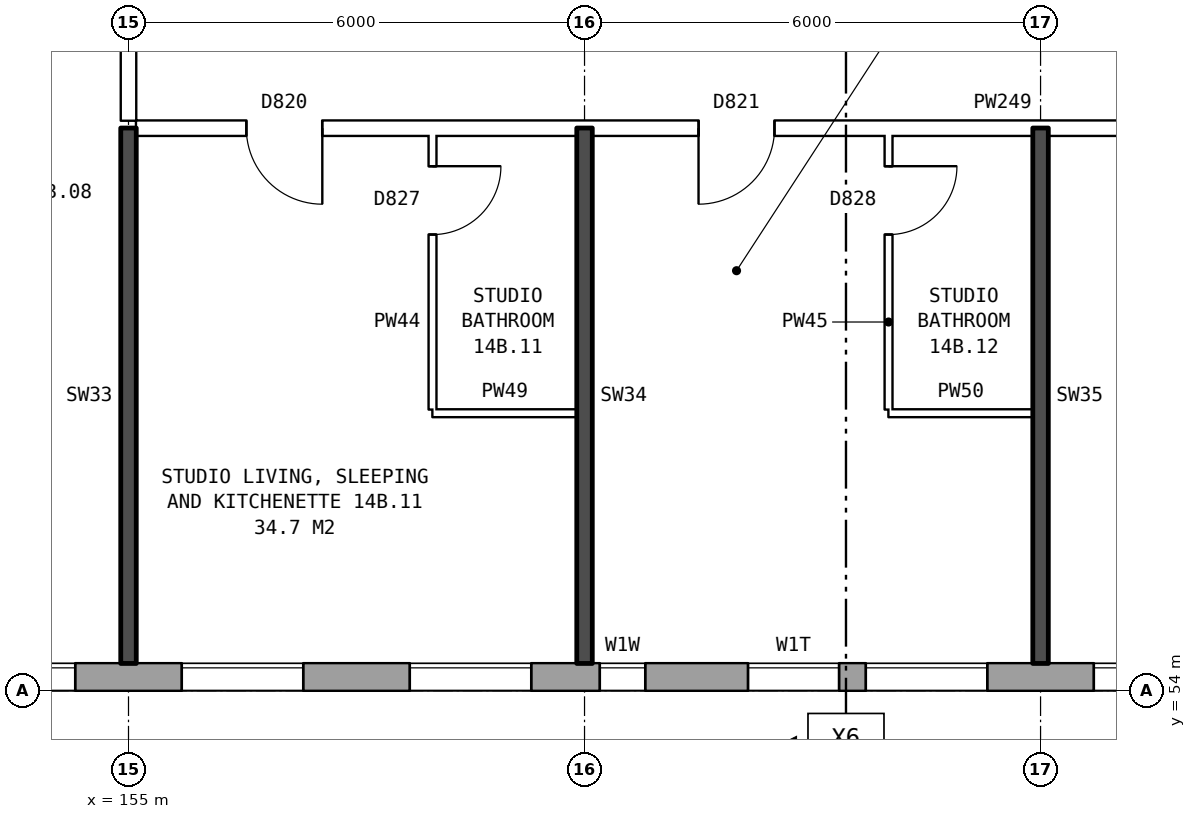
"""IFC4 building model, lengths in metres.
Left out: names, types, materials, properties, quantities, classifications, styles, units other than length and angle.
Written with IfcOpenShell. Run it as: python <this file> out.ifc"""

import sys

from ifc_helpers import new_model, si_unit, direction, frame, frame_2d, origin, place, context, subcontext, project, spatial, rectangle, extrude, element, fill, save


model = new_model("IFC4")
c1 = context("Model", 3, precision=1e-05, world=origin(), true_north=direction((0.0, 1.0)))
c2 = subcontext(c1, "Body", "Model", "MODEL_VIEW")
j1 = project(units=[si_unit("LENGTHUNIT", "METRE"), si_unit("PLANEANGLEUNIT", "RADIAN")], contexts=[c1])
p1 = place(None, origin())
s1 = spatial("IfcSite", under=j1, at=p1, CompositionType="ELEMENT")
p2 = place(p1, origin())
s2 = spatial("IfcBuilding", under=s1, at=p2, CompositionType="ELEMENT")
p3 = place(p2, frame((0.0, 0.0, 53.6)))
s3 = spatial("IfcBuildingStorey", under=s2, at=p3, CompositionType="ELEMENT", Elevation=53.6)
p4 = place(p3, frame((134.075, 54.18, 0.0), z_axis=(0.0, 0.0, 1.0), x_axis=(1.0, 0.0, 0.0)))
e1 = element("IfcWall", 1, at=p4, inside=s3, PredefinedType="STANDARD", context=c2, shape_type="SweptSolid", body=[
    extrude(rectangle(XDim=39.351, YDim=0.36, at=frame_2d((19.675, 0.0))), origin(), (0.0, 0.0, 1.0), 2.85),
])
p5 = place(p4, frame((0.625, 0.0, 0.8)))
e2 = element("IfcOpeningElement", 2, at=p5, cuts=e1, PredefinedType="OPENING", context=c2, shape_type="SweptSolid", body=[
    extrude(rectangle(XDim=1.6, YDim=1.8, at=frame_2d((0.8, 0.9))), frame((0.0, 0.19, 0.0), z_axis=(0.0, -1.0, 0.0), x_axis=(1.0, 0.0, 0.0)), (0.0, 0.0, 1.0), 0.38),
])
p6 = place(p4, frame((3.625, 0.0, 0.8)))
e3 = element("IfcOpeningElement", 3, at=p6, cuts=e1, PredefinedType="OPENING", context=c2, shape_type="SweptSolid", body=[
    extrude(rectangle(XDim=1.6, YDim=1.8, at=frame_2d((0.8, 0.9))), frame((0.0, 0.19, 0.0), z_axis=(0.0, -1.0, 0.0), x_axis=(1.0, 0.0, 0.0)), (0.0, 0.0, 1.0), 0.38),
])
p7 = place(p4, frame((6.625, 0.0, 0.8)))
e4 = element("IfcOpeningElement", 4, at=p7, cuts=e1, PredefinedType="OPENING", context=c2, shape_type="SweptSolid", body=[
    extrude(rectangle(XDim=1.6, YDim=1.8, at=frame_2d((0.8, 0.9))), frame((0.0, 0.19, 0.0), z_axis=(0.0, -1.0, 0.0), x_axis=(1.0, 0.0, 0.0)), (0.0, 0.0, 1.0), 0.38),
])
p8 = place(p4, frame((9.125, 0.0, 1.65)))
e5 = element("IfcOpeningElement", 5, at=p8, cuts=e1, PredefinedType="OPENING", context=c2, shape_type="SweptSolid", body=[
    extrude(rectangle(XDim=1.0, YDim=0.9, at=frame_2d((0.5, 0.45))), frame((0.0, 0.19, 0.0), z_axis=(0.0, -1.0, 0.0), x_axis=(1.0, 0.0, 0.0)), (0.0, 0.0, 1.0), 0.38),
])
p9 = place(p4, frame((12.625, 0.0, 0.8)))
e6 = element("IfcOpeningElement", 6, at=p9, cuts=e1, PredefinedType="OPENING", context=c2, shape_type="SweptSolid", body=[
    extrude(rectangle(XDim=1.6, YDim=1.8, at=frame_2d((0.8, 0.9))), frame((0.0, 0.19, 0.0), z_axis=(0.0, -1.0, 0.0), x_axis=(1.0, 0.0, 0.0)), (0.0, 0.0, 1.0), 0.38),
])
p10 = place(p4, frame((15.625, 0.0, 0.8)))
e7 = element("IfcOpeningElement", 7, at=p10, cuts=e1, PredefinedType="OPENING", context=c2, shape_type="SweptSolid", body=[
    extrude(rectangle(XDim=1.6, YDim=1.8, at=frame_2d((0.8, 0.9))), frame((0.0, 0.19, 0.0), z_axis=(0.0, -1.0, 0.0), x_axis=(1.0, 0.0, 0.0)), (0.0, 0.0, 1.0), 0.38),
])
p11 = place(p4, frame((18.625, 0.0, 0.8)))
e8 = element("IfcOpeningElement", 8, at=p11, cuts=e1, PredefinedType="OPENING", context=c2, shape_type="SweptSolid", body=[
    extrude(rectangle(XDim=1.6, YDim=1.8, at=frame_2d((0.8, 0.9))), frame((0.0, 0.19, 0.0), z_axis=(0.0, -1.0, 0.0), x_axis=(1.0, 0.0, 0.0)), (0.0, 0.0, 1.0), 0.38),
])
p12 = place(p4, frame((21.625, 0.0, 0.8)))
e9 = element("IfcOpeningElement", 9, at=p12, cuts=e1, PredefinedType="OPENING", context=c2, shape_type="SweptSolid", body=[
    extrude(rectangle(XDim=1.6, YDim=1.8, at=frame_2d((0.8, 0.9))), frame((0.0, 0.19, 0.0), z_axis=(0.0, -1.0, 0.0), x_axis=(1.0, 0.0, 0.0)), (0.0, 0.0, 1.0), 0.38),
])
p13 = place(p4, frame((24.625, 0.0, 0.8)))
e10 = element("IfcOpeningElement", 10, at=p13, cuts=e1, PredefinedType="OPENING", context=c2, shape_type="SweptSolid", body=[
    extrude(rectangle(XDim=1.6, YDim=1.8, at=frame_2d((0.8, 0.9))), frame((0.0, 0.19, 0.0), z_axis=(0.0, -1.0, 0.0), x_axis=(1.0, 0.0, 0.0)), (0.0, 0.0, 1.0), 0.38),
])
p14 = place(p4, frame((27.125, 0.0, 0.8)))
e11 = element("IfcOpeningElement", 11, at=p14, cuts=e1, PredefinedType="OPENING", context=c2, shape_type="SweptSolid", body=[
    extrude(rectangle(XDim=0.6, YDim=0.9, at=frame_2d((0.3, 0.45))), frame((0.0, 0.19, 0.0), z_axis=(0.0, -1.0, 0.0), x_axis=(1.0, 0.0, 0.0)), (0.0, 0.0, 1.0), 0.38),
])
p15 = place(p4, frame((30.625, 0.0, 0.8)))
e12 = element("IfcOpeningElement", 12, at=p15, cuts=e1, PredefinedType="OPENING", context=c2, shape_type="SweptSolid", body=[
    extrude(rectangle(XDim=1.6, YDim=1.8, at=frame_2d((0.8, 0.9))), frame((0.0, 0.19, 0.0), z_axis=(0.0, -1.0, 0.0), x_axis=(1.0, 0.0, 0.0)), (0.0, 0.0, 1.0), 0.38),
])
p16 = place(p4, frame((33.625, 0.0, 0.8)))
e13 = element("IfcOpeningElement", 13, at=p16, cuts=e1, PredefinedType="OPENING", context=c2, shape_type="SweptSolid", body=[
    extrude(rectangle(XDim=1.6, YDim=1.8, at=frame_2d((0.8, 0.9))), frame((0.0, 0.19, 0.0), z_axis=(0.0, -1.0, 0.0), x_axis=(1.0, 0.0, 0.0)), (0.0, 0.0, 1.0), 0.38),
])
p17 = place(p4, frame((36.625, 0.0, 0.8)))
e14 = element("IfcOpeningElement", 14, at=p17, cuts=e1, PredefinedType="OPENING", context=c2, shape_type="SweptSolid", body=[
    extrude(rectangle(XDim=1.6, YDim=1.8, at=frame_2d((0.8, 0.9))), frame((0.0, 0.19, 0.0), z_axis=(0.0, -1.0, 0.0), x_axis=(1.0, 0.0, 0.0)), (0.0, 0.0, 1.0), 0.38),
])
p18 = place(p4, frame((10.725, 0.0, 0.15)))
e15 = element("IfcOpeningElement", 15, at=p18, cuts=e1, PredefinedType="OPENING", context=c2, shape_type="SweptSolid", body=[
    extrude(rectangle(XDim=1.0, YDim=0.9, at=frame_2d((0.5, 0.45))), frame((0.0, 0.19, 0.0), z_axis=(0.0, -1.0, 0.0), x_axis=(1.0, 0.0, 0.0)), (0.0, 0.0, 1.0), 0.38),
])
p19 = place(p4, frame((29.075, 0.0, 1.7)))
e16 = element("IfcOpeningElement", 16, at=p19, cuts=e1, PredefinedType="OPENING", context=c2, shape_type="SweptSolid", body=[
    extrude(rectangle(XDim=1.2, YDim=0.9, at=frame_2d((0.6, 0.45))), frame((0.0, 0.19, 0.0), z_axis=(0.0, -1.0, 0.0), x_axis=(1.0, 0.0, 0.0)), (0.0, 0.0, 1.0), 0.38),
])
for number, where, z_axis, x_axis in (
    (17, (159.0, 57.65, 0.0), (0.0, 0.0, 1.0), (1.0, 0.0, 0.0)),
    (18, (165.0, 57.65, 0.0), (0.0, 0.0, 1.0), (1.0, 0.0, 0.0)),
):
    element("IfcWall", number, at=place(p3, frame(where, z_axis=z_axis, x_axis=x_axis)), inside=s3, PredefinedType="PARTITIONING", context=c2, shape_type="SweptSolid", body=[
        extrude(rectangle(XDim=1.9, YDim=0.1, at=frame_2d((0.95, 0.0))), origin(), (0.0, 0.0, 1.0), 2.85),
    ])
p20 = place(p3, frame((155.1, 61.4, 0.0), z_axis=(0.0, 0.0, 1.0), x_axis=(1.0, 0.0, 0.0)))
e19 = element("IfcWall", 19, at=p20, inside=s3, PredefinedType="PARTITIONING", context=c2, shape_type="SweptSolid", body=[
    extrude(rectangle(XDim=21.04, YDim=0.2, at=frame_2d((10.52, 0.0))), origin(), (0.0, 0.0, 1.0), 2.85),
])
p21 = place(p20, frame((1.45, 0.0, 0.0)))
e20 = element("IfcOpeningElement", 20, at=p21, cuts=e19, PredefinedType="OPENING", context=c2, shape_type="SweptSolid", body=[
    extrude(rectangle(XDim=1.0, YDim=2.1, at=frame_2d((0.5, 1.05))), frame((0.0, 0.11, 0.0), z_axis=(0.0, -1.0, 0.0), x_axis=(1.0, 0.0, 0.0)), (0.0, 0.0, 1.0), 0.22),
])
p22 = place(p20, frame((7.4, 0.0, 0.0)))
e21 = element("IfcOpeningElement", 21, at=p22, cuts=e19, PredefinedType="OPENING", context=c2, shape_type="SweptSolid", body=[
    extrude(rectangle(XDim=1.0, YDim=2.1, at=frame_2d((0.5, 1.05))), frame((0.0, 0.11, 0.0), z_axis=(0.0, -1.0, 0.0), x_axis=(1.0, 0.0, 0.0)), (0.0, 0.0, 1.0), 0.22),
])
p23 = place(p20, frame((14.4, 0.0, 0.0)))
e22 = element("IfcOpeningElement", 22, at=p23, cuts=e19, PredefinedType="OPENING", context=c2, shape_type="SweptSolid", body=[
    extrude(rectangle(XDim=1.0, YDim=2.1, at=frame_2d((0.5, 1.05))), frame((0.0, 0.11, 0.0), z_axis=(0.0, -1.0, 0.0), x_axis=(1.0, 0.0, 0.0)), (0.0, 0.0, 1.0), 0.22),
])
p24 = place(p3, frame((155.0, 54.36, 0.0), z_axis=(0.0, 0.0, 1.0), x_axis=(0.0, 1.0, 0.0)))
e23 = element("IfcWall", 23, at=p24, inside=s3, PredefinedType="SOLIDWALL", context=c2, shape_type="SweptSolid", body=[
    extrude(rectangle(XDim=7.04, YDim=0.2, at=frame_2d((3.52, 0.0))), origin(), (0.0, 0.0, 1.0), 2.85),
])
p25 = place(p3, frame((155.0, 61.5, 0.0), z_axis=(0.0, 0.0, 1.0), x_axis=(0.0, 1.0, 0.0)))
e24 = element("IfcWall", 24, at=p25, inside=s3, PredefinedType="PARTITIONING", context=c2, shape_type="SweptSolid", body=[
    extrude(rectangle(XDim=2.2, YDim=0.2, at=frame_2d((1.1, 0.0))), origin(), (0.0, 0.0, 1.0), 2.85),
])
p26 = place(p3, frame((159.0, 57.7, 0.0), z_axis=(0.0, 0.0, 1.0), x_axis=(0.0, 1.0, 0.0)))
e25 = element("IfcWall", 25, at=p26, inside=s3, PredefinedType="PARTITIONING", context=c2, shape_type="SweptSolid", body=[
    extrude(rectangle(XDim=3.6, YDim=0.1, at=frame_2d((1.8, 0.0))), origin(), (0.0, 0.0, 1.0), 2.85),
])
p27 = place(p26, frame((2.3, 0.0, 0.0)))
e26 = element("IfcOpeningElement", 26, at=p27, cuts=e25, PredefinedType="OPENING", context=c2, shape_type="SweptSolid", body=[
    extrude(rectangle(XDim=0.9, YDim=2.1, at=frame_2d((0.45, 1.05))), frame((0.0, 0.06, 0.0), z_axis=(0.0, -1.0, 0.0), x_axis=(1.0, 0.0, 0.0)), (0.0, 0.0, 1.0), 0.12),
])
p28 = place(p3, frame((161.0, 54.36, 0.0), z_axis=(0.0, 0.0, 1.0), x_axis=(0.0, 1.0, 0.0)))
e27 = element("IfcWall", 27, at=p28, inside=s3, PredefinedType="SOLIDWALL", context=c2, shape_type="SweptSolid", body=[
    extrude(rectangle(XDim=7.04, YDim=0.2, at=frame_2d((3.52, 0.0))), origin(), (0.0, 0.0, 1.0), 2.85),
])
p29 = place(p3, frame((165.0, 57.7, 0.0), z_axis=(0.0, 0.0, 1.0), x_axis=(0.0, 1.0, 0.0)))
e28 = element("IfcWall", 28, at=p29, inside=s3, PredefinedType="PARTITIONING", context=c2, shape_type="SweptSolid", body=[
    extrude(rectangle(XDim=3.6, YDim=0.1, at=frame_2d((1.8, 0.0))), origin(), (0.0, 0.0, 1.0), 2.85),
])
p30 = place(p29, frame((2.3, 0.0, 0.0)))
e29 = element("IfcOpeningElement", 29, at=p30, cuts=e28, PredefinedType="OPENING", context=c2, shape_type="SweptSolid", body=[
    extrude(rectangle(XDim=0.9, YDim=2.1, at=frame_2d((0.45, 1.05))), frame((0.0, 0.06, 0.0), z_axis=(0.0, -1.0, 0.0), x_axis=(1.0, 0.0, 0.0)), (0.0, 0.0, 1.0), 0.12),
])
p31 = place(p3, frame((167.0, 54.36, 0.0), z_axis=(0.0, 0.0, 1.0), x_axis=(0.0, 1.0, 0.0)))
e30 = element("IfcWall", 30, at=p31, inside=s3, PredefinedType="SOLIDWALL", context=c2, shape_type="SweptSolid", body=[
    extrude(rectangle(XDim=7.04, YDim=0.2, at=frame_2d((3.52, 0.0))), origin(), (0.0, 0.0, 1.0), 2.85),
])
p32 = place(p11, origin())
e31 = element("IfcWindow", 31, at=p32, inside=s3, PartitioningType="SINGLE_PANEL", PredefinedType="WINDOW", context=c2, shape_type="SweptSolid", body=[
    extrude(rectangle(XDim=1.6, YDim=1.8, at=frame_2d((0.8, 0.9))), frame((0.0, 0.15, 0.0), z_axis=(0.0, -1.0, 0.0), x_axis=(1.0, 0.0, 0.0)), (0.0, 0.0, 1.0), 0.06),
])
fill(e8, e31)
p33 = place(p12, origin())
e32 = element("IfcWindow", 32, at=p33, inside=s3, PartitioningType="SINGLE_PANEL", PredefinedType="WINDOW", context=c2, shape_type="SweptSolid", body=[
    extrude(rectangle(XDim=1.6, YDim=1.8, at=frame_2d((0.8, 0.9))), frame((0.0, 0.15, 0.0), z_axis=(0.0, -1.0, 0.0), x_axis=(1.0, 0.0, 0.0)), (0.0, 0.0, 1.0), 0.06),
])
fill(e9, e32)
p34 = place(p13, origin())
e33 = element("IfcWindow", 33, at=p34, inside=s3, PartitioningType="SINGLE_PANEL", PredefinedType="WINDOW", context=c2, shape_type="SweptSolid", body=[
    extrude(rectangle(XDim=1.6, YDim=1.8, at=frame_2d((0.8, 0.9))), frame((0.0, 0.15, 0.0), z_axis=(0.0, -1.0, 0.0), x_axis=(1.0, 0.0, 0.0)), (0.0, 0.0, 1.0), 0.06),
])
fill(e10, e33)
p35 = place(p14, origin())
e34 = element("IfcWindow", 34, at=p35, inside=s3, PartitioningType="SINGLE_PANEL", PredefinedType="WINDOW", context=c2, shape_type="SweptSolid", body=[
    extrude(rectangle(XDim=0.6, YDim=0.9, at=frame_2d((0.3, 0.45))), frame((0.0, 0.15, 0.0), z_axis=(0.0, -1.0, 0.0), x_axis=(1.0, 0.0, 0.0)), (0.0, 0.0, 1.0), 0.06),
])
fill(e11, e34)
p36 = place(p15, origin())
e35 = element("IfcWindow", 35, at=p36, inside=s3, PartitioningType="SINGLE_PANEL", PredefinedType="WINDOW", context=c2, shape_type="SweptSolid", body=[
    extrude(rectangle(XDim=1.6, YDim=1.8, at=frame_2d((0.8, 0.9))), frame((0.0, 0.15, 0.0), z_axis=(0.0, -1.0, 0.0), x_axis=(1.0, 0.0, 0.0)), (0.0, 0.0, 1.0), 0.06),
])
fill(e12, e35)
p37 = place(p16, origin())
e36 = element("IfcWindow", 36, at=p37, inside=s3, PartitioningType="SINGLE_PANEL", PredefinedType="WINDOW", context=c2, shape_type="SweptSolid", body=[
    extrude(rectangle(XDim=1.6, YDim=1.8, at=frame_2d((0.8, 0.9))), frame((0.0, 0.15, 0.0), z_axis=(0.0, -1.0, 0.0), x_axis=(1.0, 0.0, 0.0)), (0.0, 0.0, 1.0), 0.06),
])
fill(e13, e36)
p38 = place(p21, frame((1.0, 0.0, 0.0), z_axis=(0.0, 0.0, 1.0), x_axis=(-1.0, 0.0, 0.0)))
e37 = element("IfcDoor", 37, at=p38, inside=s3, OperationType="SINGLE_SWING_LEFT", PredefinedType="DOOR", context=c2, shape_type="SweptSolid", body=[
    extrude(rectangle(XDim=1.0, YDim=2.1, at=frame_2d((0.5, 1.05))), frame((0.0, 0.025, 0.0), z_axis=(0.0, -1.0, 0.0), x_axis=(1.0, 0.0, 0.0)), (0.0, 0.0, 1.0), 0.05),
])
fill(e20, e37)
p39 = place(p27, frame((0.9, 0.0, 0.0), z_axis=(0.0, 0.0, 1.0), x_axis=(-1.0, 0.0, 0.0)))
e38 = element("IfcDoor", 38, at=p39, inside=s3, OperationType="SINGLE_SWING_LEFT", PredefinedType="DOOR", context=c2, shape_type="SweptSolid", body=[
    extrude(rectangle(XDim=0.9, YDim=2.1, at=frame_2d((0.45, 1.05))), frame((0.0, 0.025, 0.0), z_axis=(0.0, -1.0, 0.0), x_axis=(1.0, 0.0, 0.0)), (0.0, 0.0, 1.0), 0.05),
])
fill(e26, e38)
p40 = place(p22, frame((1.0, 0.0, 0.0), z_axis=(0.0, 0.0, 1.0), x_axis=(-1.0, 0.0, 0.0)))
e39 = element("IfcDoor", 39, at=p40, inside=s3, OperationType="SINGLE_SWING_RIGHT", PredefinedType="DOOR", context=c2, shape_type="SweptSolid", body=[
    extrude(rectangle(XDim=1.0, YDim=2.1, at=frame_2d((0.5, 1.05))), frame((0.0, 0.025, 0.0), z_axis=(0.0, -1.0, 0.0), x_axis=(1.0, 0.0, 0.0)), (0.0, 0.0, 1.0), 0.05),
])
fill(e21, e39)
p41 = place(p30, frame((0.9, 0.0, 0.0), z_axis=(0.0, 0.0, 1.0), x_axis=(-1.0, 0.0, 0.0)))
e40 = element("IfcDoor", 40, at=p41, inside=s3, OperationType="SINGLE_SWING_LEFT", PredefinedType="DOOR", context=c2, shape_type="SweptSolid", body=[
    extrude(rectangle(XDim=0.9, YDim=2.1, at=frame_2d((0.45, 1.05))), frame((0.0, 0.025, 0.0), z_axis=(0.0, -1.0, 0.0), x_axis=(1.0, 0.0, 0.0)), (0.0, 0.0, 1.0), 0.05),
])
fill(e29, e40)
p42 = place(p19, origin())
e41 = element("IfcWindow", 41, at=p42, inside=s3, PartitioningType="SINGLE_PANEL", PredefinedType="WINDOW", context=c2, shape_type="SweptSolid", body=[
    extrude(rectangle(XDim=1.2, YDim=0.9, at=frame_2d((0.6, 0.45))), frame((0.0, 0.15, 0.0), z_axis=(0.0, -1.0, 0.0), x_axis=(1.0, 0.0, 0.0)), (0.0, 0.0, 1.0), 0.06),
])
fill(e16, e41)
save(model, sys.argv[1])
